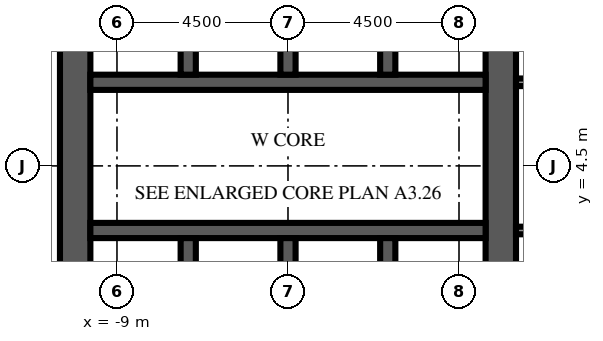
"""IFC4 building model, lengths in metres.
Left out: names, types, materials, properties, quantities, classifications, styles, units other than length and angle.
Written with IfcOpenShell. Run it as: python <this file> out.ifc"""

import sys

from ifc_helpers import new_model, si_unit, direction, frame, frame_2d, origin, place, context, subcontext, project, spatial, rectangle, extrude, element, fill, save


model = new_model("IFC4")
c1 = context("Model", 3, precision=1e-05, world=origin(), true_north=direction((0.0, 1.0)))
c2 = subcontext(c1, "Body", "Model", "MODEL_VIEW")
j1 = project(units=[si_unit("LENGTHUNIT", "METRE"), si_unit("PLANEANGLEUNIT", "RADIAN")], contexts=[c1])
p1 = place(None, origin())
s1 = spatial("IfcSite", under=j1, at=p1, CompositionType="ELEMENT")
p2 = place(p1, origin())
s2 = spatial("IfcBuilding", under=s1, at=p2, CompositionType="ELEMENT")
p3 = place(p2, frame((0.0, 0.0, 169.1)))
s3 = spatial("IfcBuildingStorey", under=s2, at=p3, CompositionType="ELEMENT", Elevation=169.1)
p4 = place(p3, frame((-10.1, -9.0, 0.0), z_axis=(0.0, 0.0, 1.0), x_axis=(0.0, 1.0, 0.0)))
e1 = element("IfcWall", 1, at=p4, inside=s3, PredefinedType="SHEAR", context=c2, shape_type="SweptSolid", body=[
    extrude(rectangle(XDim=27.5, YDim=0.8, at=frame_2d((13.75, 0.0))), origin(), (0.0, 0.0, 1.0), 4.1),
])
p5 = place(p4, frame((12.55, 0.0, 0.0)))
e2 = element("IfcOpeningElement", 2, at=p5, cuts=e1, PredefinedType="OPENING", context=c2, shape_type="SweptSolid", body=[
    extrude(rectangle(XDim=2.4, YDim=2.4, at=frame_2d((1.2, 1.2))), frame((0.0, 0.41, 0.0), z_axis=(0.0, -1.0, 0.0), x_axis=(1.0, 0.0, 0.0)), (0.0, 0.0, 1.0), 0.82),
])
p6 = place(p4, frame((6.825, 0.0, 0.0)))
e3 = element("IfcOpeningElement", 3, at=p6, cuts=e1, PredefinedType="OPENING", context=c2, shape_type="SweptSolid", body=[
    extrude(rectangle(XDim=1.2, YDim=2.1, at=frame_2d((0.6, 1.05))), frame((0.0, 0.41, 0.0), z_axis=(0.0, -1.0, 0.0), x_axis=(1.0, 0.0, 0.0)), (0.0, 0.0, 1.0), 0.82),
])
p7 = place(p4, frame((19.475, 0.0, 0.0)))
e4 = element("IfcOpeningElement", 4, at=p7, cuts=e1, PredefinedType="OPENING", context=c2, shape_type="SweptSolid", body=[
    extrude(rectangle(XDim=1.2, YDim=2.1, at=frame_2d((0.6, 1.05))), frame((0.0, 0.41, 0.0), z_axis=(0.0, -1.0, 0.0), x_axis=(1.0, 0.0, 0.0)), (0.0, 0.0, 1.0), 0.82),
])
p8 = place(p3, frame((1.1, -9.0, 0.0), z_axis=(0.0, 0.0, 1.0), x_axis=(0.0, 1.0, 0.0)))
e5 = element("IfcWall", 5, at=p8, inside=s3, PredefinedType="SHEAR", context=c2, shape_type="SweptSolid", body=[
    extrude(rectangle(XDim=27.5, YDim=0.8, at=frame_2d((13.75, 0.0))), origin(), (0.0, 0.0, 1.0), 4.1),
])
p9 = place(p8, frame((12.55, 0.0, 0.0)))
e6 = element("IfcOpeningElement", 6, at=p9, cuts=e5, PredefinedType="OPENING", context=c2, shape_type="SweptSolid", body=[
    extrude(rectangle(XDim=2.4, YDim=2.4, at=frame_2d((1.2, 1.2))), frame((0.0, 0.41, 0.0), z_axis=(0.0, -1.0, 0.0), x_axis=(1.0, 0.0, 0.0)), (0.0, 0.0, 1.0), 0.82),
])
p10 = place(p8, frame((3.95, 0.0, 0.0)))
e7 = element("IfcOpeningElement", 7, at=p10, cuts=e5, PredefinedType="OPENING", context=c2, shape_type="SweptSolid", body=[
    extrude(rectangle(XDim=1.2, YDim=2.1, at=frame_2d((0.6, 1.05))), frame((0.0, 0.41, 0.0), z_axis=(0.0, -1.0, 0.0), x_axis=(1.0, 0.0, 0.0)), (0.0, 0.0, 1.0), 0.82),
])
p11 = place(p8, frame((22.35, 0.0, 0.0)))
e8 = element("IfcOpeningElement", 8, at=p11, cuts=e5, PredefinedType="OPENING", context=c2, shape_type="SweptSolid", body=[
    extrude(rectangle(XDim=1.2, YDim=2.1, at=frame_2d((0.6, 1.05))), frame((0.0, 0.41, 0.0), z_axis=(0.0, -1.0, 0.0), x_axis=(1.0, 0.0, 0.0)), (0.0, 0.0, 1.0), 0.82),
])
p12 = place(p3, frame((-9.7, 2.8, 0.0), z_axis=(0.0, 0.0, 1.0), x_axis=(1.0, 0.0, 0.0)))
e9 = element("IfcWall", 9, at=p12, inside=s3, PredefinedType="SHEAR", context=c2, shape_type="SweptSolid", body=[
    extrude(rectangle(XDim=10.4, YDim=0.4, at=frame_2d((5.2, 0.0))), origin(), (0.0, 0.0, 1.0), 4.1),
])
p13 = place(p12, frame((0.738, 0.0, 0.0)))
e10 = element("IfcOpeningElement", 10, at=p13, cuts=e9, PredefinedType="OPENING", context=c2, shape_type="SweptSolid", body=[
    extrude(rectangle(XDim=1.1, YDim=2.1, at=frame_2d((0.55, 1.05))), frame((0.0, 0.21, 0.0), z_axis=(0.0, -1.0, 0.0), x_axis=(1.0, 0.0, 0.0)), (0.0, 0.0, 1.0), 0.42),
])
p14 = place(p12, frame((3.337, 0.0, 0.0)))
e11 = element("IfcOpeningElement", 11, at=p14, cuts=e9, PredefinedType="OPENING", context=c2, shape_type="SweptSolid", body=[
    extrude(rectangle(XDim=1.1, YDim=2.1, at=frame_2d((0.55, 1.05))), frame((0.0, 0.21, 0.0), z_axis=(0.0, -1.0, 0.0), x_axis=(1.0, 0.0, 0.0)), (0.0, 0.0, 1.0), 0.42),
])
p15 = place(p12, frame((6.012, 0.0, 0.0)))
e12 = element("IfcOpeningElement", 12, at=p15, cuts=e9, PredefinedType="OPENING", context=c2, shape_type="SweptSolid", body=[
    extrude(rectangle(XDim=1.0, YDim=2.1, at=frame_2d((0.5, 1.05))), frame((0.0, 0.21, 0.0), z_axis=(0.0, -1.0, 0.0), x_axis=(1.0, 0.0, 0.0)), (0.0, 0.0, 1.0), 0.42),
])
p16 = place(p12, frame((8.613, 0.0, 0.0)))
e13 = element("IfcOpeningElement", 13, at=p16, cuts=e9, PredefinedType="OPENING", context=c2, shape_type="SweptSolid", body=[
    extrude(rectangle(XDim=1.0, YDim=2.1, at=frame_2d((0.5, 1.05))), frame((0.0, 0.21, 0.0), z_axis=(0.0, -1.0, 0.0), x_axis=(1.0, 0.0, 0.0)), (0.0, 0.0, 1.0), 0.42),
])
p17 = place(p3, frame((-9.7, 6.7, 0.0), z_axis=(0.0, 0.0, 1.0), x_axis=(1.0, 0.0, 0.0)))
e14 = element("IfcWall", 14, at=p17, inside=s3, PredefinedType="SHEAR", context=c2, shape_type="SweptSolid", body=[
    extrude(rectangle(XDim=10.4, YDim=0.4, at=frame_2d((5.2, 0.0))), origin(), (0.0, 0.0, 1.0), 4.1),
])
p18 = place(p17, frame((3.337, 0.0, 0.0)))
e15 = element("IfcOpeningElement", 15, at=p18, cuts=e14, PredefinedType="OPENING", context=c2, shape_type="SweptSolid", body=[
    extrude(rectangle(XDim=1.1, YDim=2.1, at=frame_2d((0.55, 1.05))), frame((0.0, 0.21, 0.0), z_axis=(0.0, -1.0, 0.0), x_axis=(1.0, 0.0, 0.0)), (0.0, 0.0, 1.0), 0.42),
])
p19 = place(p17, frame((5.962, 0.0, 0.0)))
e16 = element("IfcOpeningElement", 16, at=p19, cuts=e14, PredefinedType="OPENING", context=c2, shape_type="SweptSolid", body=[
    extrude(rectangle(XDim=1.1, YDim=2.1, at=frame_2d((0.55, 1.05))), frame((0.0, 0.21, 0.0), z_axis=(0.0, -1.0, 0.0), x_axis=(1.0, 0.0, 0.0)), (0.0, 0.0, 1.0), 0.42),
])
p20 = place(p17, frame((8.663, 0.0, 0.0)))
e17 = element("IfcOpeningElement", 17, at=p20, cuts=e14, PredefinedType="OPENING", context=c2, shape_type="SweptSolid", body=[
    extrude(rectangle(XDim=1.1, YDim=2.1, at=frame_2d((0.55, 1.05))), frame((0.0, 0.21, 0.0), z_axis=(0.0, -1.0, 0.0), x_axis=(1.0, 0.0, 0.0)), (0.0, 0.0, 1.0), 0.42),
])
p21 = place(p17, frame((0.688, 0.0, 0.0)))
e18 = element("IfcOpeningElement", 18, at=p21, cuts=e14, PredefinedType="OPENING", context=c2, shape_type="SweptSolid", body=[
    extrude(rectangle(XDim=1.0, YDim=2.1, at=frame_2d((0.5, 1.05))), frame((0.0, 0.21, 0.0), z_axis=(0.0, -1.0, 0.0), x_axis=(1.0, 0.0, 0.0)), (0.0, 0.0, 1.0), 0.42),
])
for number, where, z_axis, x_axis in (
    (19, (-7.125, -0.3, 0.0), (0.0, 0.0, 1.0), (0.0, 1.0, 0.0)),
    (20, (-7.125, 6.9, 0.0), (0.0, 0.0, 1.0), (0.0, 1.0, 0.0)),
    (21, (-4.5, -0.3, 0.0), (0.0, 0.0, 1.0), (0.0, 1.0, 0.0)),
    (22, (-4.5, 6.9, 0.0), (0.0, 0.0, 1.0), (0.0, 1.0, 0.0)),
    (23, (-1.875, -0.3, 0.0), (0.0, 0.0, 1.0), (0.0, 1.0, 0.0)),
    (24, (-1.875, 6.9, 0.0), (0.0, 0.0, 1.0), (0.0, 1.0, 0.0)),
):
    element("IfcWall", number, at=place(p3, frame(where, z_axis=z_axis, x_axis=x_axis)), inside=s3, PredefinedType="SHEAR", context=c2, shape_type="SweptSolid", body=[
        extrude(rectangle(XDim=2.9, YDim=0.4, at=frame_2d((1.45, 0.0))), origin(), (0.0, 0.0, 1.0), 4.1),
    ])
for number, where, z_axis, x_axis in (
    (25, (1.5, 2.8, 0.0), (0.0, 0.0, 1.0), (1.0, 0.0, 0.0)),
    (26, (1.5, 6.7, 0.0), (0.0, 0.0, 1.0), (1.0, 0.0, 0.0)),
):
    element("IfcWall", number, at=place(p3, frame(where, z_axis=z_axis, x_axis=x_axis)), inside=s3, PredefinedType="PARTITIONING", context=c2, shape_type="SweptSolid", body=[
        extrude(rectangle(XDim=1.5, YDim=0.2, at=frame_2d((0.75, 0.0))), origin(), (0.0, 0.0, 1.0), 3.65),
    ])
p22 = place(p13, origin())
e27 = element("IfcDoor", 27, at=p22, inside=s3, OperationType="DOUBLE_DOOR_SLIDING", PredefinedType="DOOR", context=c2, shape_type="SweptSolid", body=[
    extrude(rectangle(XDim=1.1, YDim=2.1, at=frame_2d((0.55, 1.05))), frame((0.0, 0.025, 0.0), z_axis=(0.0, -1.0, 0.0), x_axis=(1.0, 0.0, 0.0)), (0.0, 0.0, 1.0), 0.05),
])
fill(e10, e27)
p23 = place(p14, origin())
e28 = element("IfcDoor", 28, at=p23, inside=s3, OperationType="DOUBLE_DOOR_SLIDING", PredefinedType="DOOR", context=c2, shape_type="SweptSolid", body=[
    extrude(rectangle(XDim=1.1, YDim=2.1, at=frame_2d((0.55, 1.05))), frame((0.0, 0.025, 0.0), z_axis=(0.0, -1.0, 0.0), x_axis=(1.0, 0.0, 0.0)), (0.0, 0.0, 1.0), 0.05),
])
fill(e11, e28)
p24 = place(p18, origin())
e29 = element("IfcDoor", 29, at=p24, inside=s3, OperationType="DOUBLE_DOOR_SLIDING", PredefinedType="DOOR", context=c2, shape_type="SweptSolid", body=[
    extrude(rectangle(XDim=1.1, YDim=2.1, at=frame_2d((0.55, 1.05))), frame((0.0, 0.025, 0.0), z_axis=(0.0, -1.0, 0.0), x_axis=(1.0, 0.0, 0.0)), (0.0, 0.0, 1.0), 0.05),
])
fill(e15, e29)
p25 = place(p19, origin())
e30 = element("IfcDoor", 30, at=p25, inside=s3, OperationType="DOUBLE_DOOR_SLIDING", PredefinedType="DOOR", context=c2, shape_type="SweptSolid", body=[
    extrude(rectangle(XDim=1.1, YDim=2.1, at=frame_2d((0.55, 1.05))), frame((0.0, 0.025, 0.0), z_axis=(0.0, -1.0, 0.0), x_axis=(1.0, 0.0, 0.0)), (0.0, 0.0, 1.0), 0.05),
])
fill(e16, e30)
p26 = place(p20, origin())
e31 = element("IfcDoor", 31, at=p26, inside=s3, OperationType="DOUBLE_DOOR_SLIDING", PredefinedType="DOOR", context=c2, shape_type="SweptSolid", body=[
    extrude(rectangle(XDim=1.1, YDim=2.1, at=frame_2d((0.55, 1.05))), frame((0.0, 0.025, 0.0), z_axis=(0.0, -1.0, 0.0), x_axis=(1.0, 0.0, 0.0)), (0.0, 0.0, 1.0), 0.05),
])
fill(e17, e31)
p27 = place(p5, origin())
e32 = element("IfcDoor", 32, at=p27, inside=s3, OperationType="DOUBLE_DOOR_DOUBLE_SWING", PredefinedType="DOOR", context=c2, shape_type="SweptSolid", body=[
    extrude(rectangle(XDim=2.4, YDim=2.4, at=frame_2d((1.2, 1.2))), frame((0.0, 0.025, 0.0), z_axis=(0.0, -1.0, 0.0), x_axis=(1.0, 0.0, 0.0)), (0.0, 0.0, 1.0), 0.05),
])
fill(e2, e32)
p28 = place(p9, origin())
e33 = element("IfcDoor", 33, at=p28, inside=s3, OperationType="DOUBLE_DOOR_DOUBLE_SWING", PredefinedType="DOOR", context=c2, shape_type="SweptSolid", body=[
    extrude(rectangle(XDim=2.4, YDim=2.4, at=frame_2d((1.2, 1.2))), frame((0.0, 0.025, 0.0), z_axis=(0.0, -1.0, 0.0), x_axis=(1.0, 0.0, 0.0)), (0.0, 0.0, 1.0), 0.05),
])
fill(e6, e33)
p29 = place(p15, origin())
e34 = element("IfcDoor", 34, at=p29, inside=s3, OperationType="SINGLE_SWING_LEFT", PredefinedType="DOOR", context=c2, shape_type="SweptSolid", body=[
    extrude(rectangle(XDim=1.0, YDim=2.1, at=frame_2d((0.5, 1.05))), frame((0.0, 0.025, 0.0), z_axis=(0.0, -1.0, 0.0), x_axis=(1.0, 0.0, 0.0)), (0.0, 0.0, 1.0), 0.05),
])
fill(e12, e34)
p30 = place(p16, origin())
e35 = element("IfcDoor", 35, at=p30, inside=s3, OperationType="SINGLE_SWING_RIGHT", PredefinedType="DOOR", context=c2, shape_type="SweptSolid", body=[
    extrude(rectangle(XDim=1.0, YDim=2.1, at=frame_2d((0.5, 1.05))), frame((0.0, 0.025, 0.0), z_axis=(0.0, -1.0, 0.0), x_axis=(1.0, 0.0, 0.0)), (0.0, 0.0, 1.0), 0.05),
])
fill(e13, e35)
p31 = place(p21, origin())
e36 = element("IfcDoor", 36, at=p31, inside=s3, OperationType="SINGLE_SWING_LEFT", PredefinedType="DOOR", context=c2, shape_type="SweptSolid", body=[
    extrude(rectangle(XDim=1.0, YDim=2.1, at=frame_2d((0.5, 1.05))), frame((0.0, 0.025, 0.0), z_axis=(0.0, -1.0, 0.0), x_axis=(1.0, 0.0, 0.0)), (0.0, 0.0, 1.0), 0.05),
])
fill(e18, e36)
save(model, sys.argv[1])
